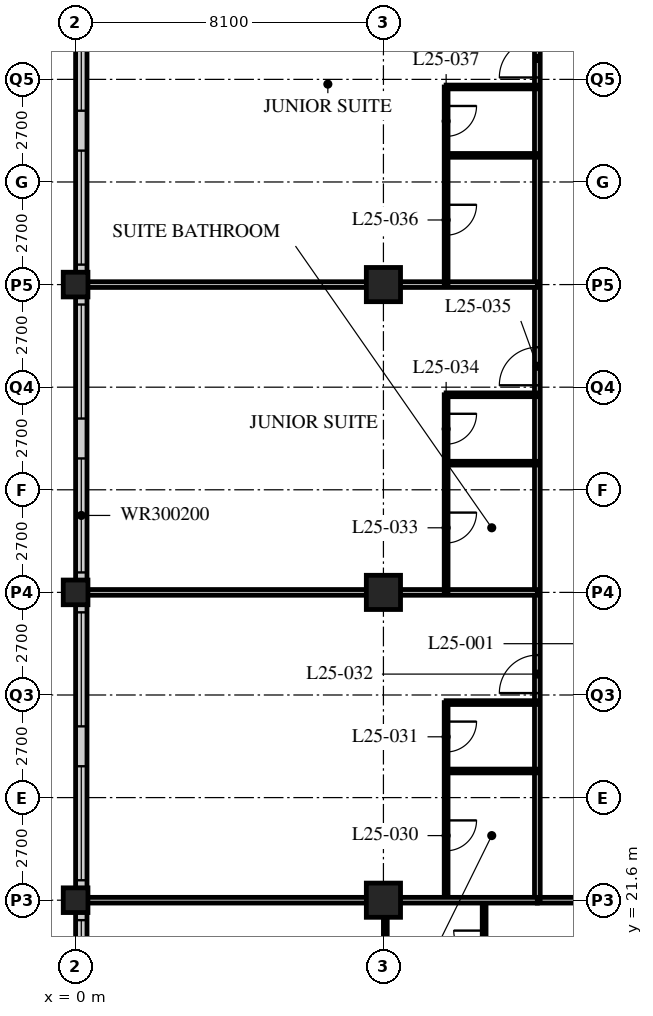
"""IFC4 building model, lengths in metres.
Left out: names, types, materials, properties, quantities, classifications, styles, units other than length and angle.
Written with IfcOpenShell. Run it as: python <this file> out.ifc"""

import sys

from ifc_helpers import new_model, si_unit, direction, frame, frame_2d, origin, origin_2d, place, context, subcontext, project, spatial, rectangle, hollow_rectangle, extrude, element, fill, save


model = new_model("IFC4")
c1 = context("Model", 3, precision=1e-05, world=origin(), true_north=direction((0.0, 1.0)))
c2 = subcontext(c1, "Body", "Model", "MODEL_VIEW")
j1 = project(units=[si_unit("LENGTHUNIT", "METRE"), si_unit("PLANEANGLEUNIT", "RADIAN")], contexts=[c1])
p1 = place(None, origin())
s1 = spatial("IfcSite", under=j1, at=p1, CompositionType="ELEMENT")
p2 = place(p1, origin())
s2 = spatial("IfcBuilding", under=s1, at=p2, CompositionType="ELEMENT")
p3 = place(p2, frame((0.0, 0.0, 103.4)))
s3 = spatial("IfcBuildingStorey", under=s2, at=p3, CompositionType="ELEMENT", Elevation=103.4)
for number, where, z_axis, x_axis in (
    (1, (0.0, 21.6, 0.0), (0.0, 0.0, 1.0), (1.0, 0.0, 0.0)),
    (2, (0.0, 29.7, 0.0), (0.0, 0.0, 1.0), (1.0, 0.0, 0.0)),
    (3, (0.0, 37.8, 0.0), (0.0, 0.0, 1.0), (1.0, 0.0, 0.0)),
):
    element("IfcColumn", number, at=place(p3, frame(where, z_axis=z_axis, x_axis=x_axis)), inside=s3, PredefinedType="COLUMN", context=c2, shape_type="SweptSolid", body=[
        extrude(hollow_rectangle(XDim=0.65, YDim=0.65, WallThickness=0.055, at=origin_2d()), origin(), (0.0, 0.0, 1.0), 3.4),
    ])
for number, where, z_axis, x_axis in (
    (4, (8.1, 21.6, 0.0), (0.0, 0.0, 1.0), (1.0, 0.0, 0.0)),
    (5, (8.1, 29.7, 0.0), (0.0, 0.0, 1.0), (1.0, 0.0, 0.0)),
    (6, (8.1, 37.8, 0.0), (0.0, 0.0, 1.0), (1.0, 0.0, 0.0)),
):
    element("IfcColumn", number, at=place(p3, frame(where, z_axis=z_axis, x_axis=x_axis)), inside=s3, PredefinedType="COLUMN", context=c2, shape_type="SweptSolid", body=[
        extrude(hollow_rectangle(XDim=0.9, YDim=0.9, WallThickness=0.1, at=origin_2d()), origin(), (0.0, 0.0, 1.0), 3.4),
    ])
p4 = place(p3, frame((0.15, 45.6, 0.0), z_axis=(0.0, 0.0, 1.0), x_axis=(0.0, -1.0, 0.0)))
e7 = element("IfcWall", 7, at=p4, inside=s3, PredefinedType="SOLIDWALL", context=c2, shape_type="SweptSolid", body=[
    extrude(rectangle(XDim=32.1, YDim=0.3, at=frame_2d((16.05, 0.0))), origin(), (0.0, 0.0, 1.0), 3.19),
])
p5 = place(p4, frame((0.225, 0.0, 0.9)))
e8 = element("IfcOpeningElement", 8, at=p5, cuts=e7, PredefinedType="OPENING", context=c2, shape_type="SweptSolid", body=[
    extrude(rectangle(XDim=3.0, YDim=2.0, at=frame_2d((1.5, 1.0))), frame((0.0, 0.16, 0.0), z_axis=(0.0, -1.0, 0.0), x_axis=(1.0, 0.0, 0.0)), (0.0, 0.0, 1.0), 0.32),
])
p6 = place(p4, frame((4.275, 0.0, 0.9)))
e9 = element("IfcOpeningElement", 9, at=p6, cuts=e7, PredefinedType="OPENING", context=c2, shape_type="SweptSolid", body=[
    extrude(rectangle(XDim=3.0, YDim=2.0, at=frame_2d((1.5, 1.0))), frame((0.0, 0.16, 0.0), z_axis=(0.0, -1.0, 0.0), x_axis=(1.0, 0.0, 0.0)), (0.0, 0.0, 1.0), 0.32),
])
p7 = place(p4, frame((8.325, 0.0, 0.9)))
e10 = element("IfcOpeningElement", 10, at=p7, cuts=e7, PredefinedType="OPENING", context=c2, shape_type="SweptSolid", body=[
    extrude(rectangle(XDim=3.0, YDim=2.0, at=frame_2d((1.5, 1.0))), frame((0.0, 0.16, 0.0), z_axis=(0.0, -1.0, 0.0), x_axis=(1.0, 0.0, 0.0)), (0.0, 0.0, 1.0), 0.32),
])
p8 = place(p4, frame((12.375, 0.0, 0.9)))
e11 = element("IfcOpeningElement", 11, at=p8, cuts=e7, PredefinedType="OPENING", context=c2, shape_type="SweptSolid", body=[
    extrude(rectangle(XDim=3.0, YDim=2.0, at=frame_2d((1.5, 1.0))), frame((0.0, 0.16, 0.0), z_axis=(0.0, -1.0, 0.0), x_axis=(1.0, 0.0, 0.0)), (0.0, 0.0, 1.0), 0.32),
])
p9 = place(p4, frame((16.425, 0.0, 0.9)))
e12 = element("IfcOpeningElement", 12, at=p9, cuts=e7, PredefinedType="OPENING", context=c2, shape_type="SweptSolid", body=[
    extrude(rectangle(XDim=3.0, YDim=2.0, at=frame_2d((1.5, 1.0))), frame((0.0, 0.16, 0.0), z_axis=(0.0, -1.0, 0.0), x_axis=(1.0, 0.0, 0.0)), (0.0, 0.0, 1.0), 0.32),
])
p10 = place(p4, frame((20.475, 0.0, 0.9)))
e13 = element("IfcOpeningElement", 13, at=p10, cuts=e7, PredefinedType="OPENING", context=c2, shape_type="SweptSolid", body=[
    extrude(rectangle(XDim=3.0, YDim=2.0, at=frame_2d((1.5, 1.0))), frame((0.0, 0.16, 0.0), z_axis=(0.0, -1.0, 0.0), x_axis=(1.0, 0.0, 0.0)), (0.0, 0.0, 1.0), 0.32),
])
p11 = place(p4, frame((24.525, 0.0, 0.9)))
e14 = element("IfcOpeningElement", 14, at=p11, cuts=e7, PredefinedType="OPENING", context=c2, shape_type="SweptSolid", body=[
    extrude(rectangle(XDim=3.0, YDim=2.0, at=frame_2d((1.5, 1.0))), frame((0.0, 0.16, 0.0), z_axis=(0.0, -1.0, 0.0), x_axis=(1.0, 0.0, 0.0)), (0.0, 0.0, 1.0), 0.32),
])
p12 = place(p4, frame((28.575, 0.0, 0.9)))
e15 = element("IfcOpeningElement", 15, at=p12, cuts=e7, PredefinedType="OPENING", context=c2, shape_type="SweptSolid", body=[
    extrude(rectangle(XDim=3.0, YDim=2.0, at=frame_2d((1.5, 1.0))), frame((0.0, 0.16, 0.0), z_axis=(0.0, -1.0, 0.0), x_axis=(1.0, 0.0, 0.0)), (0.0, 0.0, 1.0), 0.32),
])
p13 = place(p3, frame((12.15, 21.6, 0.0), z_axis=(0.0, 0.0, 1.0), x_axis=(1.0, 0.0, 0.0)))
e16 = element("IfcWall", 16, at=p13, inside=s3, PredefinedType="PARTITIONING", context=c2, shape_type="SweptSolid", body=[
    extrude(rectangle(XDim=32.4, YDim=0.15, at=frame_2d((16.2, 0.0))), origin(), (0.0, 0.0, 1.0), 2.578),
])
p14 = place(p13, frame((5.95, 0.0, 0.0)))
e17 = element("IfcOpeningElement", 17, at=p14, cuts=e16, PredefinedType="OPENING", context=c2, shape_type="SweptSolid", body=[
    extrude(rectangle(XDim=1.0, YDim=2.1, at=frame_2d((0.5, 1.05))), frame((0.0, 0.085, 0.0), z_axis=(0.0, -1.0, 0.0), x_axis=(1.0, 0.0, 0.0)), (0.0, 0.0, 1.0), 0.17),
])
p15 = place(p13, frame((14.05, 0.0, 0.0)))
e18 = element("IfcOpeningElement", 18, at=p15, cuts=e16, PredefinedType="OPENING", context=c2, shape_type="SweptSolid", body=[
    extrude(rectangle(XDim=1.0, YDim=2.1, at=frame_2d((0.5, 1.05))), frame((0.0, 0.085, 0.0), z_axis=(0.0, -1.0, 0.0), x_axis=(1.0, 0.0, 0.0)), (0.0, 0.0, 1.0), 0.17),
])
p16 = place(p13, frame((22.15, 0.0, 0.0)))
e19 = element("IfcOpeningElement", 19, at=p16, cuts=e16, PredefinedType="OPENING", context=c2, shape_type="SweptSolid", body=[
    extrude(rectangle(XDim=1.0, YDim=2.1, at=frame_2d((0.5, 1.05))), frame((0.0, 0.085, 0.0), z_axis=(0.0, -1.0, 0.0), x_axis=(1.0, 0.0, 0.0)), (0.0, 0.0, 1.0), 0.17),
])
p17 = place(p13, frame((1.525, 0.0, 0.0)))
e20 = element("IfcOpeningElement", 20, at=p17, cuts=e16, PredefinedType="OPENING", context=c2, shape_type="SweptSolid", body=[
    extrude(rectangle(XDim=1.0, YDim=2.1, at=frame_2d((0.5, 1.05))), frame((0.0, 0.085, 0.0), z_axis=(0.0, -1.0, 0.0), x_axis=(1.0, 0.0, 0.0)), (0.0, 0.0, 1.0), 0.17),
])
p18 = place(p13, frame((29.875, 0.0, 0.0)))
e21 = element("IfcOpeningElement", 21, at=p18, cuts=e16, PredefinedType="OPENING", context=c2, shape_type="SweptSolid", body=[
    extrude(rectangle(XDim=1.0, YDim=2.1, at=frame_2d((0.5, 1.05))), frame((0.0, 0.085, 0.0), z_axis=(0.0, -1.0, 0.0), x_axis=(1.0, 0.0, 0.0)), (0.0, 0.0, 1.0), 0.17),
])
p19 = place(p3, frame((12.15, 21.6, 0.0), z_axis=(0.0, 0.0, 1.0), x_axis=(0.0, 1.0, 0.0)))
e22 = element("IfcWall", 22, at=p19, inside=s3, PredefinedType="PARTITIONING", context=c2, shape_type="SweptSolid", body=[
    extrude(rectangle(XDim=24.3, YDim=0.15, at=frame_2d((12.15, 0.0))), origin(), (0.0, 0.0, 1.0), 3.19),
])
p20 = place(p19, frame((5.45, 0.0, 0.0)))
e23 = element("IfcOpeningElement", 23, at=p20, cuts=e22, PredefinedType="OPENING", context=c2, shape_type="SweptSolid", body=[
    extrude(rectangle(XDim=1.0, YDim=2.1, at=frame_2d((0.5, 1.05))), frame((0.0, 0.085, 0.0), z_axis=(0.0, -1.0, 0.0), x_axis=(1.0, 0.0, 0.0)), (0.0, 0.0, 1.0), 0.17),
])
p21 = place(p19, frame((13.55, 0.0, 0.0)))
e24 = element("IfcOpeningElement", 24, at=p21, cuts=e22, PredefinedType="OPENING", context=c2, shape_type="SweptSolid", body=[
    extrude(rectangle(XDim=1.0, YDim=2.1, at=frame_2d((0.5, 1.05))), frame((0.0, 0.085, 0.0), z_axis=(0.0, -1.0, 0.0), x_axis=(1.0, 0.0, 0.0)), (0.0, 0.0, 1.0), 0.17),
])
p22 = place(p19, frame((21.65, 0.0, 0.0)))
e25 = element("IfcOpeningElement", 25, at=p22, cuts=e22, PredefinedType="OPENING", context=c2, shape_type="SweptSolid", body=[
    extrude(rectangle(XDim=1.0, YDim=2.1, at=frame_2d((0.5, 1.05))), frame((0.0, 0.085, 0.0), z_axis=(0.0, -1.0, 0.0), x_axis=(1.0, 0.0, 0.0)), (0.0, 0.0, 1.0), 0.17),
])
p23 = place(p3, frame((9.75, 21.6, 0.0), z_axis=(0.0, 0.0, 1.0), x_axis=(0.0, 1.0, 0.0)))
e26 = element("IfcWall", 26, at=p23, inside=s3, PredefinedType="PARTITIONING", context=c2, shape_type="SweptSolid", body=[
    extrude(rectangle(XDim=5.2, YDim=0.1, at=frame_2d((2.6, 0.0))), origin(), (0.0, 0.0, 1.0), 3.19),
])
p24 = place(p23, frame((1.3, 0.0, 0.0)))
e27 = element("IfcOpeningElement", 27, at=p24, cuts=e26, PredefinedType="OPENING", context=c2, shape_type="SweptSolid", body=[
    extrude(rectangle(XDim=0.8, YDim=2.1, at=frame_2d((0.4, 1.05))), frame((0.0, 0.06, 0.0), z_axis=(0.0, -1.0, 0.0), x_axis=(1.0, 0.0, 0.0)), (0.0, 0.0, 1.0), 0.12),
])
p25 = place(p23, frame((3.9, 0.0, 0.0)))
e28 = element("IfcOpeningElement", 28, at=p25, cuts=e26, PredefinedType="OPENING", context=c2, shape_type="SweptSolid", body=[
    extrude(rectangle(XDim=0.8, YDim=2.1, at=frame_2d((0.4, 1.05))), frame((0.0, 0.06, 0.0), z_axis=(0.0, -1.0, 0.0), x_axis=(1.0, 0.0, 0.0)), (0.0, 0.0, 1.0), 0.12),
])
for number, where, z_axis, x_axis in (
    (29, (12.15, 25.0, 0.0), (0.0, 0.0, 1.0), (-1.0, 0.0, 0.0)),
    (30, (12.15, 26.8, 0.0), (0.0, 0.0, 1.0), (-1.0, 0.0, 0.0)),
):
    element("IfcWall", number, at=place(p3, frame(where, z_axis=z_axis, x_axis=x_axis)), inside=s3, PredefinedType="PARTITIONING", context=c2, shape_type="SweptSolid", body=[
        extrude(rectangle(XDim=2.4, YDim=0.1, at=frame_2d((1.2, 0.0))), origin(), (0.0, 0.0, 1.0), 3.19),
    ])
p26 = place(p3, frame((12.15, 29.7, 0.0), z_axis=(0.0, 0.0, 1.0), x_axis=(-1.0, 0.0, 0.0)))
e31 = element("IfcWall", 31, at=p26, inside=s3, PredefinedType="PARTITIONING", context=c2, shape_type="SweptSolid", body=[
    extrude(rectangle(XDim=11.85, YDim=0.15, at=frame_2d((5.925, 0.0))), origin(), (0.0, 0.0, 1.0), 2.578),
])
p27 = place(p3, frame((9.75, 29.7, 0.0), z_axis=(0.0, 0.0, 1.0), x_axis=(0.0, 1.0, 0.0)))
e32 = element("IfcWall", 32, at=p27, inside=s3, PredefinedType="PARTITIONING", context=c2, shape_type="SweptSolid", body=[
    extrude(rectangle(XDim=5.2, YDim=0.1, at=frame_2d((2.6, 0.0))), origin(), (0.0, 0.0, 1.0), 3.19),
])
p28 = place(p27, frame((1.3, 0.0, 0.0)))
e33 = element("IfcOpeningElement", 33, at=p28, cuts=e32, PredefinedType="OPENING", context=c2, shape_type="SweptSolid", body=[
    extrude(rectangle(XDim=0.8, YDim=2.1, at=frame_2d((0.4, 1.05))), frame((0.0, 0.06, 0.0), z_axis=(0.0, -1.0, 0.0), x_axis=(1.0, 0.0, 0.0)), (0.0, 0.0, 1.0), 0.12),
])
p29 = place(p27, frame((3.9, 0.0, 0.0)))
e34 = element("IfcOpeningElement", 34, at=p29, cuts=e32, PredefinedType="OPENING", context=c2, shape_type="SweptSolid", body=[
    extrude(rectangle(XDim=0.8, YDim=2.1, at=frame_2d((0.4, 1.05))), frame((0.0, 0.06, 0.0), z_axis=(0.0, -1.0, 0.0), x_axis=(1.0, 0.0, 0.0)), (0.0, 0.0, 1.0), 0.12),
])
for number, where, z_axis, x_axis in (
    (35, (12.15, 33.1, 0.0), (0.0, 0.0, 1.0), (-1.0, 0.0, 0.0)),
    (36, (12.15, 34.9, 0.0), (0.0, 0.0, 1.0), (-1.0, 0.0, 0.0)),
):
    element("IfcWall", number, at=place(p3, frame(where, z_axis=z_axis, x_axis=x_axis)), inside=s3, PredefinedType="PARTITIONING", context=c2, shape_type="SweptSolid", body=[
        extrude(rectangle(XDim=2.4, YDim=0.1, at=frame_2d((1.2, 0.0))), origin(), (0.0, 0.0, 1.0), 3.19),
    ])
p30 = place(p3, frame((12.15, 37.8, 0.0), z_axis=(0.0, 0.0, 1.0), x_axis=(-1.0, 0.0, 0.0)))
e37 = element("IfcWall", 37, at=p30, inside=s3, PredefinedType="PARTITIONING", context=c2, shape_type="SweptSolid", body=[
    extrude(rectangle(XDim=11.85, YDim=0.15, at=frame_2d((5.925, 0.0))), origin(), (0.0, 0.0, 1.0), 2.578),
])
p31 = place(p3, frame((9.75, 37.8, 0.0), z_axis=(0.0, 0.0, 1.0), x_axis=(0.0, 1.0, 0.0)))
e38 = element("IfcWall", 38, at=p31, inside=s3, PredefinedType="PARTITIONING", context=c2, shape_type="SweptSolid", body=[
    extrude(rectangle(XDim=5.2, YDim=0.1, at=frame_2d((2.6, 0.0))), origin(), (0.0, 0.0, 1.0), 3.19),
])
p32 = place(p31, frame((1.3, 0.0, 0.0)))
e39 = element("IfcOpeningElement", 39, at=p32, cuts=e38, PredefinedType="OPENING", context=c2, shape_type="SweptSolid", body=[
    extrude(rectangle(XDim=0.8, YDim=2.1, at=frame_2d((0.4, 1.05))), frame((0.0, 0.06, 0.0), z_axis=(0.0, -1.0, 0.0), x_axis=(1.0, 0.0, 0.0)), (0.0, 0.0, 1.0), 0.12),
])
p33 = place(p31, frame((3.9, 0.0, 0.0)))
e40 = element("IfcOpeningElement", 40, at=p33, cuts=e38, PredefinedType="OPENING", context=c2, shape_type="SweptSolid", body=[
    extrude(rectangle(XDim=0.8, YDim=2.1, at=frame_2d((0.4, 1.05))), frame((0.0, 0.06, 0.0), z_axis=(0.0, -1.0, 0.0), x_axis=(1.0, 0.0, 0.0)), (0.0, 0.0, 1.0), 0.12),
])
for number, where, z_axis, x_axis in (
    (41, (12.15, 41.2, 0.0), (0.0, 0.0, 1.0), (-1.0, 0.0, 0.0)),
    (42, (12.15, 43.0, 0.0), (0.0, 0.0, 1.0), (-1.0, 0.0, 0.0)),
):
    element("IfcWall", number, at=place(p3, frame(where, z_axis=z_axis, x_axis=x_axis)), inside=s3, PredefinedType="PARTITIONING", context=c2, shape_type="SweptSolid", body=[
        extrude(rectangle(XDim=2.4, YDim=0.1, at=frame_2d((1.2, 0.0))), origin(), (0.0, 0.0, 1.0), 3.19),
    ])
p34 = place(p3, frame((10.75, 21.6, 0.0), z_axis=(0.0, 0.0, 1.0), x_axis=(0.0, -1.0, 0.0)))
e43 = element("IfcWall", 43, at=p34, inside=s3, PredefinedType="PARTITIONING", context=c2, shape_type="SweptSolid", body=[
    extrude(rectangle(XDim=2.4, YDim=0.1, at=frame_2d((1.2, 0.0))), origin(), (0.0, 0.0, 1.0), 3.19),
])
p35 = place(p34, frame((0.8, 0.0, 0.0)))
e44 = element("IfcOpeningElement", 44, at=p35, cuts=e43, PredefinedType="OPENING", context=c2, shape_type="SweptSolid", body=[
    extrude(rectangle(XDim=0.8, YDim=2.1, at=frame_2d((0.4, 1.05))), frame((0.0, 0.06, 0.0), z_axis=(0.0, -1.0, 0.0), x_axis=(1.0, 0.0, 0.0)), (0.0, 0.0, 1.0), 0.12),
])
p36 = place(p3, frame((8.15, 21.6, 0.0), z_axis=(0.0, 0.0, 1.0), x_axis=(0.0, -1.0, 0.0)))
e45 = element("IfcWall", 45, at=p36, inside=s3, PredefinedType="PARTITIONING", context=c2, shape_type="SweptSolid", body=[
    extrude(rectangle(XDim=2.4, YDim=0.1, at=frame_2d((1.2, 0.0))), origin(), (0.0, 0.0, 1.0), 2.578),
])
p37 = place(p3, frame((0.3, 21.6, 0.0), z_axis=(0.0, 0.0, 1.0), x_axis=(1.0, 0.0, 0.0)))
e46 = element("IfcWall", 46, at=p37, inside=s3, PredefinedType="PARTITIONING", context=c2, shape_type="SweptSolid", body=[
    extrude(rectangle(XDim=11.85, YDim=0.15, at=frame_2d((5.925, 0.0))), origin(), (0.0, 0.0, 1.0), 2.578),
])
p38 = place(p5, origin())
e47 = element("IfcWindow", 47, at=p38, inside=s3, PartitioningType="SINGLE_PANEL", PredefinedType="WINDOW", context=c2, shape_type="SweptSolid", body=[
    extrude(rectangle(XDim=3.0, YDim=2.0, at=frame_2d((1.5, 1.0))), frame((0.0, 0.03, 0.0), z_axis=(0.0, -1.0, 0.0), x_axis=(1.0, 0.0, 0.0)), (0.0, 0.0, 1.0), 0.06),
])
fill(e8, e47)
p39 = place(p6, origin())
e48 = element("IfcWindow", 48, at=p39, inside=s3, PartitioningType="SINGLE_PANEL", PredefinedType="WINDOW", context=c2, shape_type="SweptSolid", body=[
    extrude(rectangle(XDim=3.0, YDim=2.0, at=frame_2d((1.5, 1.0))), frame((0.0, 0.03, 0.0), z_axis=(0.0, -1.0, 0.0), x_axis=(1.0, 0.0, 0.0)), (0.0, 0.0, 1.0), 0.06),
])
fill(e9, e48)
p40 = place(p7, origin())
e49 = element("IfcWindow", 49, at=p40, inside=s3, PartitioningType="SINGLE_PANEL", PredefinedType="WINDOW", context=c2, shape_type="SweptSolid", body=[
    extrude(rectangle(XDim=3.0, YDim=2.0, at=frame_2d((1.5, 1.0))), frame((0.0, 0.03, 0.0), z_axis=(0.0, -1.0, 0.0), x_axis=(1.0, 0.0, 0.0)), (0.0, 0.0, 1.0), 0.06),
])
fill(e10, e49)
p41 = place(p8, origin())
e50 = element("IfcWindow", 50, at=p41, inside=s3, PartitioningType="SINGLE_PANEL", PredefinedType="WINDOW", context=c2, shape_type="SweptSolid", body=[
    extrude(rectangle(XDim=3.0, YDim=2.0, at=frame_2d((1.5, 1.0))), frame((0.0, 0.03, 0.0), z_axis=(0.0, -1.0, 0.0), x_axis=(1.0, 0.0, 0.0)), (0.0, 0.0, 1.0), 0.06),
])
fill(e11, e50)
p42 = place(p9, origin())
e51 = element("IfcWindow", 51, at=p42, inside=s3, PartitioningType="SINGLE_PANEL", PredefinedType="WINDOW", context=c2, shape_type="SweptSolid", body=[
    extrude(rectangle(XDim=3.0, YDim=2.0, at=frame_2d((1.5, 1.0))), frame((0.0, 0.03, 0.0), z_axis=(0.0, -1.0, 0.0), x_axis=(1.0, 0.0, 0.0)), (0.0, 0.0, 1.0), 0.06),
])
fill(e12, e51)
p43 = place(p10, origin())
e52 = element("IfcWindow", 52, at=p43, inside=s3, PartitioningType="SINGLE_PANEL", PredefinedType="WINDOW", context=c2, shape_type="SweptSolid", body=[
    extrude(rectangle(XDim=3.0, YDim=2.0, at=frame_2d((1.5, 1.0))), frame((0.0, 0.03, 0.0), z_axis=(0.0, -1.0, 0.0), x_axis=(1.0, 0.0, 0.0)), (0.0, 0.0, 1.0), 0.06),
])
fill(e13, e52)
p44 = place(p11, origin())
e53 = element("IfcWindow", 53, at=p44, inside=s3, PartitioningType="SINGLE_PANEL", PredefinedType="WINDOW", context=c2, shape_type="SweptSolid", body=[
    extrude(rectangle(XDim=3.0, YDim=2.0, at=frame_2d((1.5, 1.0))), frame((0.0, 0.03, 0.0), z_axis=(0.0, -1.0, 0.0), x_axis=(1.0, 0.0, 0.0)), (0.0, 0.0, 1.0), 0.06),
])
fill(e14, e53)
p45 = place(p24, origin())
e54 = element("IfcDoor", 54, at=p45, inside=s3, OperationType="SINGLE_SWING_LEFT", PredefinedType="DOOR", context=c2, shape_type="SweptSolid", body=[
    extrude(rectangle(XDim=0.8, YDim=2.1, at=frame_2d((0.4, 1.05))), frame((0.0, 0.025, 0.0), z_axis=(0.0, -1.0, 0.0), x_axis=(1.0, 0.0, 0.0)), (0.0, 0.0, 1.0), 0.05),
])
fill(e27, e54)
p46 = place(p25, origin())
e55 = element("IfcDoor", 55, at=p46, inside=s3, OperationType="SINGLE_SWING_LEFT", PredefinedType="DOOR", context=c2, shape_type="SweptSolid", body=[
    extrude(rectangle(XDim=0.8, YDim=2.1, at=frame_2d((0.4, 1.05))), frame((0.0, 0.025, 0.0), z_axis=(0.0, -1.0, 0.0), x_axis=(1.0, 0.0, 0.0)), (0.0, 0.0, 1.0), 0.05),
])
fill(e28, e55)
p47 = place(p20, origin())
e56 = element("IfcDoor", 56, at=p47, inside=s3, OperationType="SINGLE_SWING_LEFT", PredefinedType="DOOR", context=c2, shape_type="SweptSolid", body=[
    extrude(rectangle(XDim=1.0, YDim=2.1, at=frame_2d((0.5, 1.05))), frame((0.0, 0.025, 0.0), z_axis=(0.0, -1.0, 0.0), x_axis=(1.0, 0.0, 0.0)), (0.0, 0.0, 1.0), 0.05),
])
fill(e23, e56)
p48 = place(p28, origin())
e57 = element("IfcDoor", 57, at=p48, inside=s3, OperationType="SINGLE_SWING_LEFT", PredefinedType="DOOR", context=c2, shape_type="SweptSolid", body=[
    extrude(rectangle(XDim=0.8, YDim=2.1, at=frame_2d((0.4, 1.05))), frame((0.0, 0.025, 0.0), z_axis=(0.0, -1.0, 0.0), x_axis=(1.0, 0.0, 0.0)), (0.0, 0.0, 1.0), 0.05),
])
fill(e33, e57)
p49 = place(p29, origin())
e58 = element("IfcDoor", 58, at=p49, inside=s3, OperationType="SINGLE_SWING_LEFT", PredefinedType="DOOR", context=c2, shape_type="SweptSolid", body=[
    extrude(rectangle(XDim=0.8, YDim=2.1, at=frame_2d((0.4, 1.05))), frame((0.0, 0.025, 0.0), z_axis=(0.0, -1.0, 0.0), x_axis=(1.0, 0.0, 0.0)), (0.0, 0.0, 1.0), 0.05),
])
fill(e34, e58)
p50 = place(p21, origin())
e59 = element("IfcDoor", 59, at=p50, inside=s3, OperationType="SINGLE_SWING_LEFT", PredefinedType="DOOR", context=c2, shape_type="SweptSolid", body=[
    extrude(rectangle(XDim=1.0, YDim=2.1, at=frame_2d((0.5, 1.05))), frame((0.0, 0.025, 0.0), z_axis=(0.0, -1.0, 0.0), x_axis=(1.0, 0.0, 0.0)), (0.0, 0.0, 1.0), 0.05),
])
fill(e24, e59)
p51 = place(p32, origin())
e60 = element("IfcDoor", 60, at=p51, inside=s3, OperationType="SINGLE_SWING_LEFT", PredefinedType="DOOR", context=c2, shape_type="SweptSolid", body=[
    extrude(rectangle(XDim=0.8, YDim=2.1, at=frame_2d((0.4, 1.05))), frame((0.0, 0.025, 0.0), z_axis=(0.0, -1.0, 0.0), x_axis=(1.0, 0.0, 0.0)), (0.0, 0.0, 1.0), 0.05),
])
fill(e39, e60)
p52 = place(p33, origin())
e61 = element("IfcDoor", 61, at=p52, inside=s3, OperationType="SINGLE_SWING_LEFT", PredefinedType="DOOR", context=c2, shape_type="SweptSolid", body=[
    extrude(rectangle(XDim=0.8, YDim=2.1, at=frame_2d((0.4, 1.05))), frame((0.0, 0.025, 0.0), z_axis=(0.0, -1.0, 0.0), x_axis=(1.0, 0.0, 0.0)), (0.0, 0.0, 1.0), 0.05),
])
fill(e40, e61)
p53 = place(p22, origin())
e62 = element("IfcDoor", 62, at=p53, inside=s3, OperationType="SINGLE_SWING_LEFT", PredefinedType="DOOR", context=c2, shape_type="SweptSolid", body=[
    extrude(rectangle(XDim=1.0, YDim=2.1, at=frame_2d((0.5, 1.05))), frame((0.0, 0.025, 0.0), z_axis=(0.0, -1.0, 0.0), x_axis=(1.0, 0.0, 0.0)), (0.0, 0.0, 1.0), 0.05),
])
fill(e25, e62)
p54 = place(p35, origin())
e63 = element("IfcDoor", 63, at=p54, inside=s3, OperationType="SINGLE_SWING_RIGHT", PredefinedType="DOOR", context=c2, shape_type="SweptSolid", body=[
    extrude(rectangle(XDim=0.8, YDim=2.1, at=frame_2d((0.4, 1.05))), frame((0.0, 0.025, 0.0), z_axis=(0.0, -1.0, 0.0), x_axis=(1.0, 0.0, 0.0)), (0.0, 0.0, 1.0), 0.05),
])
fill(e44, e63)
save(model, sys.argv[1])
